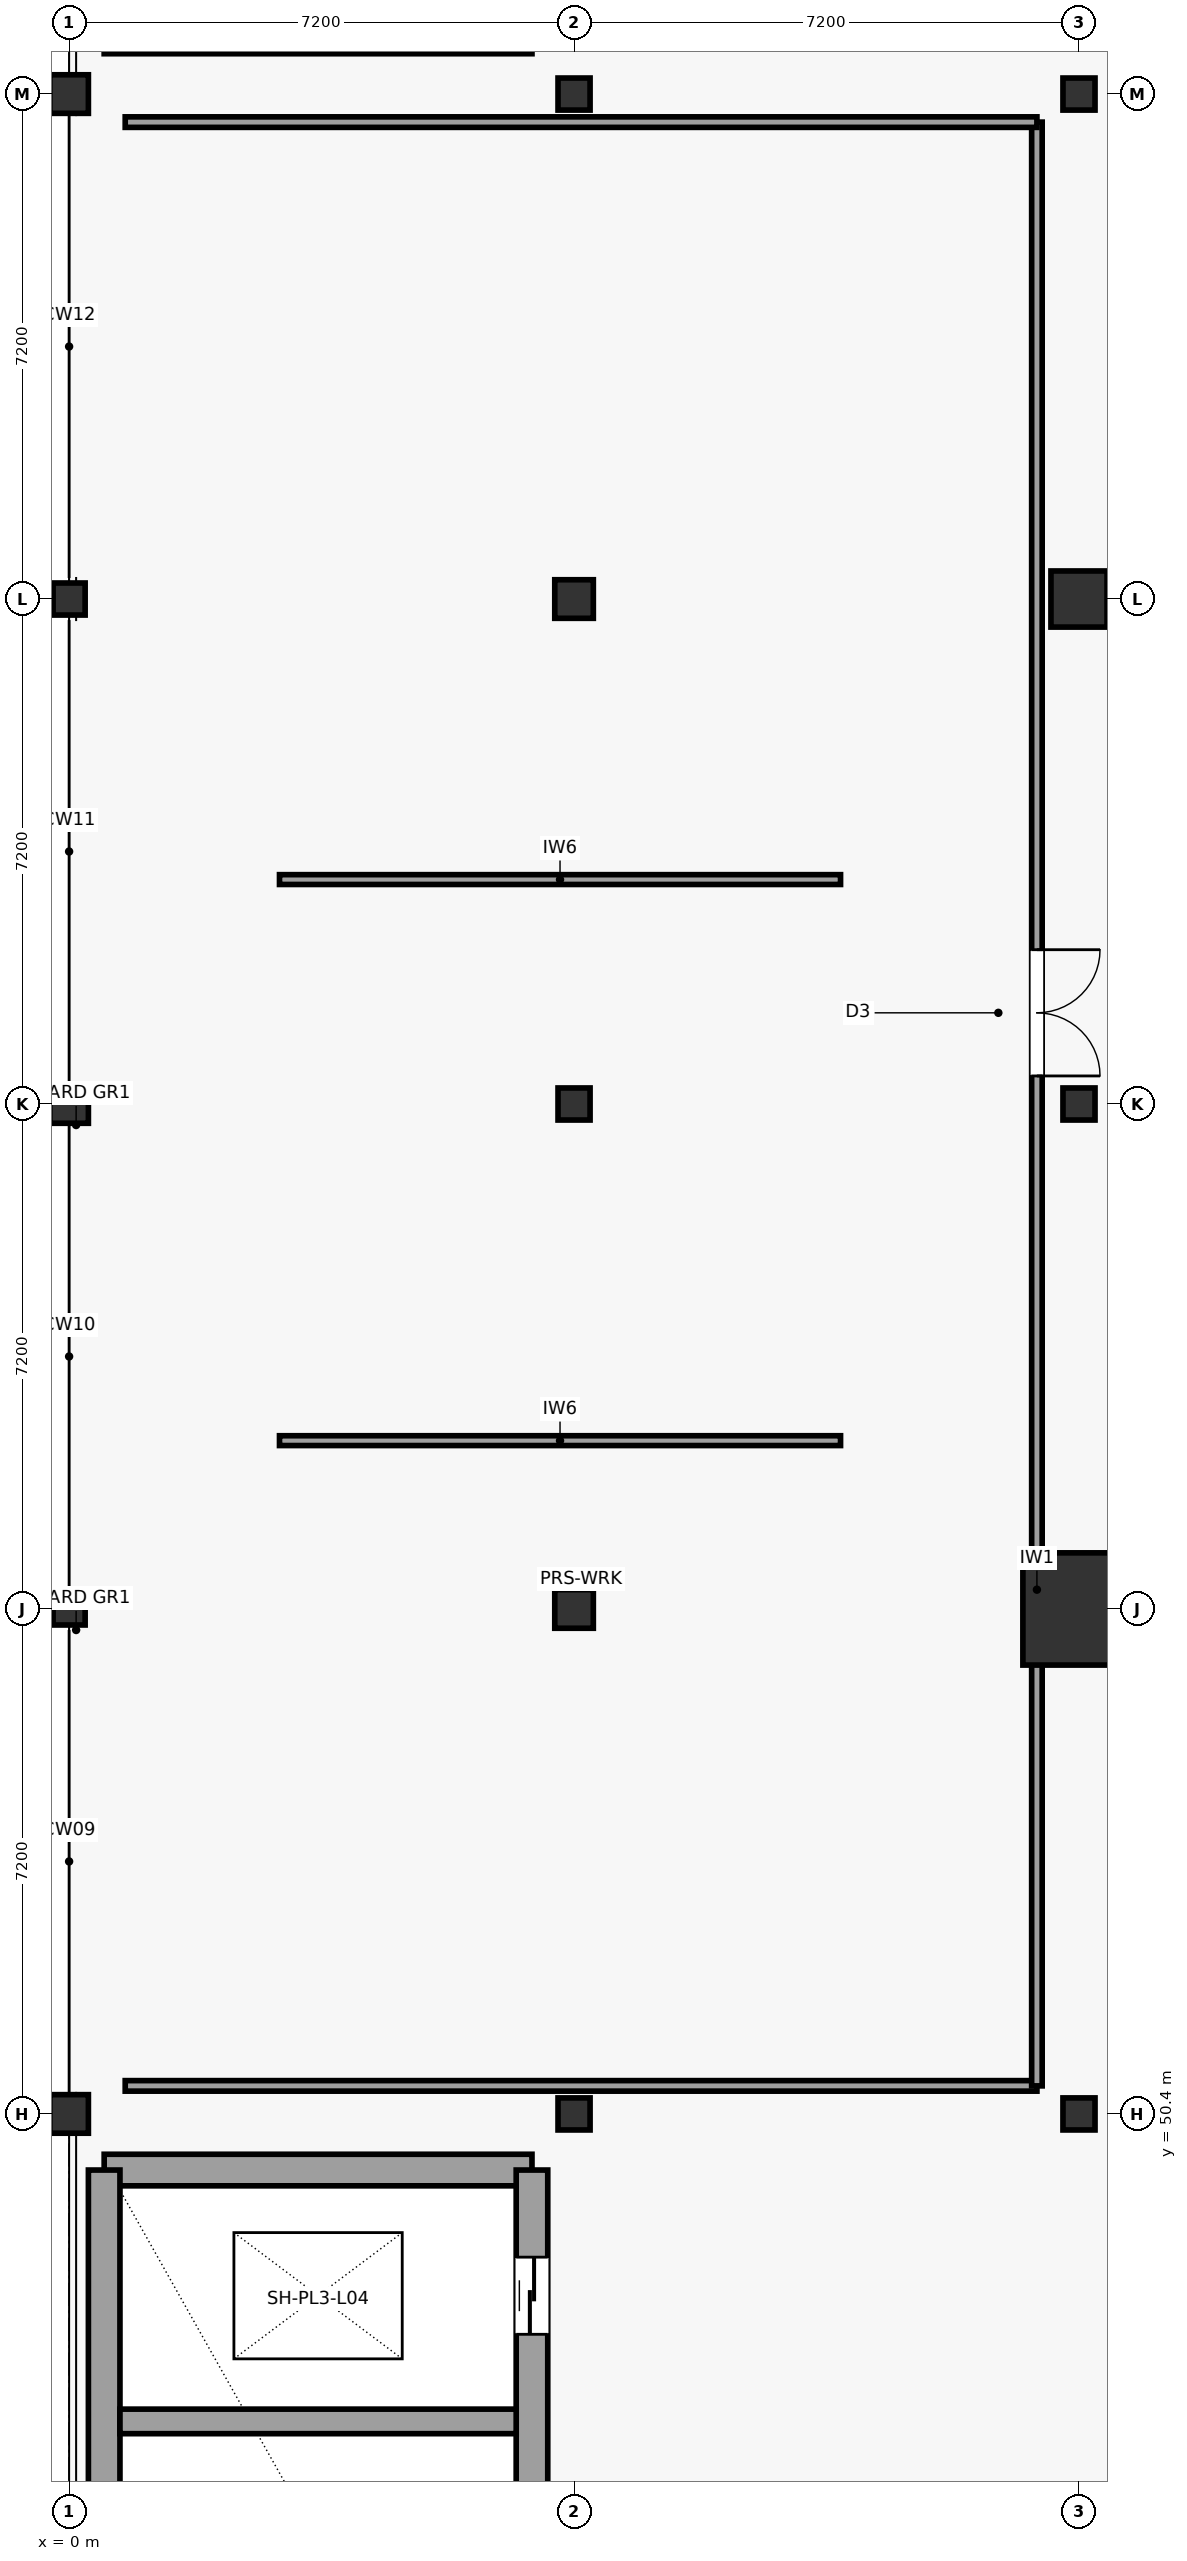
"""IFC4 building model, lengths in metres.
Left out: names, types, materials, properties, quantities, classifications, styles, units other than length and angle.
Written with IfcOpenShell. Run it as: python <this file> out.ifc"""

import sys

from ifc_helpers import new_model, si_unit, direction, frame, frame_2d, origin, origin_2d, place, context, subcontext, project, spatial, rectangle, circle, hollow_circle, extrude, element, fill, save


model = new_model("IFC4")
c1 = context("Model", 3, precision=1e-05, world=origin(), true_north=direction((0.0, 1.0)))
c2 = subcontext(c1, "Body", "Model", "MODEL_VIEW")
j1 = project(units=[si_unit("LENGTHUNIT", "METRE"), si_unit("PLANEANGLEUNIT", "RADIAN")], contexts=[c1])
p1 = place(None, origin())
s1 = spatial("IfcSite", under=j1, at=p1, CompositionType="ELEMENT")
p2 = place(p1, origin())
s2 = spatial("IfcBuilding", under=s1, at=p2, CompositionType="ELEMENT")
p3 = place(p2, frame((0.0, 0.0, 18.6)))
s3 = spatial("IfcBuildingStorey", under=s2, at=p3, CompositionType="ELEMENT", Elevation=18.6)
p4 = place(p3, frame((0.0, 50.4, 0.0), z_axis=(0.0, 0.0, 1.0), x_axis=(1.0, 0.0, 0.0)))
e1 = element("IfcColumn", 1, at=p4, inside=s3, PredefinedType="COLUMN", context=c2, shape_type="SweptSolid", body=[
    extrude(rectangle(XDim=0.55, YDim=0.55, at=origin_2d()), origin(), (0.0, 0.0, 1.0), 4.4),
])
p5 = place(p3, frame((0.0, 57.6, 0.0), z_axis=(0.0, 0.0, 1.0), x_axis=(1.0, 0.0, 0.0)))
e2 = element("IfcColumn", 2, at=p5, inside=s3, PredefinedType="COLUMN", context=c2, shape_type="SweptSolid", body=[
    extrude(hollow_circle(Radius=0.229, WallThickness=0.02, at=origin_2d()), origin(), (0.0, 0.0, 1.0), 4.4),
])
p6 = place(p3, frame((0.0, 64.8, 0.0), z_axis=(0.0, 0.0, 1.0), x_axis=(1.0, 0.0, 0.0)))
e3 = element("IfcColumn", 3, at=p6, inside=s3, PredefinedType="COLUMN", context=c2, shape_type="SweptSolid", body=[
    extrude(rectangle(XDim=0.55, YDim=0.55, at=origin_2d()), origin(), (0.0, 0.0, 1.0), 4.4),
])
p7 = place(p3, frame((0.0, 72.0, 0.0), z_axis=(0.0, 0.0, 1.0), x_axis=(1.0, 0.0, 0.0)))
e4 = element("IfcColumn", 4, at=p7, inside=s3, PredefinedType="COLUMN", context=c2, shape_type="SweptSolid", body=[
    extrude(hollow_circle(Radius=0.229, WallThickness=0.02, at=origin_2d()), origin(), (0.0, 0.0, 1.0), 4.4),
])
p8 = place(p3, frame((0.0, 79.2, 0.0), z_axis=(0.0, 0.0, 1.0), x_axis=(1.0, 0.0, 0.0)))
e5 = element("IfcColumn", 5, at=p8, inside=s3, PredefinedType="COLUMN", context=c2, shape_type="SweptSolid", body=[
    extrude(rectangle(XDim=0.55, YDim=0.55, at=origin_2d()), origin(), (0.0, 0.0, 1.0), 4.4),
])
p9 = place(p3, frame((7.2, 50.4, 0.0), z_axis=(0.0, 0.0, 1.0), x_axis=(1.0, 0.0, 0.0)))
e6 = element("IfcColumn", 6, at=p9, inside=s3, PredefinedType="COLUMN", context=c2, shape_type="SweptSolid", body=[
    extrude(hollow_circle(Radius=0.229, WallThickness=0.02, at=origin_2d()), origin(), (0.0, 0.0, 1.0), 4.4),
])
p10 = place(p3, frame((7.2, 57.6, 0.0), z_axis=(0.0, 0.0, 1.0), x_axis=(1.0, 0.0, 0.0)))
e7 = element("IfcColumn", 7, at=p10, inside=s3, PredefinedType="COLUMN", context=c2, shape_type="SweptSolid", body=[
    extrude(rectangle(XDim=0.55, YDim=0.55, at=origin_2d()), origin(), (0.0, 0.0, 1.0), 4.4),
])
p11 = place(p3, frame((7.2, 64.8, 0.0), z_axis=(0.0, 0.0, 1.0), x_axis=(1.0, 0.0, 0.0)))
e8 = element("IfcColumn", 8, at=p11, inside=s3, PredefinedType="COLUMN", context=c2, shape_type="SweptSolid", body=[
    extrude(hollow_circle(Radius=0.229, WallThickness=0.02, at=origin_2d()), origin(), (0.0, 0.0, 1.0), 4.4),
])
p12 = place(p3, frame((7.2, 72.0, 0.0), z_axis=(0.0, 0.0, 1.0), x_axis=(1.0, 0.0, 0.0)))
e9 = element("IfcColumn", 9, at=p12, inside=s3, PredefinedType="COLUMN", context=c2, shape_type="SweptSolid", body=[
    extrude(rectangle(XDim=0.55, YDim=0.55, at=origin_2d()), origin(), (0.0, 0.0, 1.0), 4.4),
])
for number, where, z_axis, x_axis in (
    (10, (7.2, 79.2, 0.0), (0.0, 0.0, 1.0), (1.0, 0.0, 0.0)),
    (11, (14.4, 50.4, 0.0), (0.0, 0.0, 1.0), (1.0, 0.0, 0.0)),
):
    element("IfcColumn", number, at=place(p3, frame(where, z_axis=z_axis, x_axis=x_axis)), inside=s3, PredefinedType="COLUMN", context=c2, shape_type="SweptSolid", body=[
        extrude(hollow_circle(Radius=0.229, WallThickness=0.02, at=origin_2d()), origin(), (0.0, 0.0, 1.0), 4.4),
    ])
p13 = place(p3, frame((14.4, 57.6, 0.0), z_axis=(0.0, 0.0, 1.0), x_axis=(1.0, 0.0, 0.0)))
e12 = element("IfcColumn", 12, at=p13, inside=s3, PredefinedType="COLUMN", context=c2, shape_type="SweptSolid", body=[
    extrude(circle(Radius=0.8, at=origin_2d()), origin(), (0.0, 0.0, 1.0), 4.4),
])
p14 = place(p3, frame((14.4, 64.8, 0.0), z_axis=(0.0, 0.0, 1.0), x_axis=(1.0, 0.0, 0.0)))
e13 = element("IfcColumn", 13, at=p14, inside=s3, PredefinedType="COLUMN", context=c2, shape_type="SweptSolid", body=[
    extrude(hollow_circle(Radius=0.229, WallThickness=0.02, at=origin_2d()), origin(), (0.0, 0.0, 1.0), 4.4),
])
p15 = place(p3, frame((14.4, 72.0, 0.0), z_axis=(0.0, 0.0, 1.0), x_axis=(1.0, 0.0, 0.0)))
e14 = element("IfcColumn", 14, at=p15, inside=s3, PredefinedType="COLUMN", context=c2, shape_type="SweptSolid", body=[
    extrude(circle(Radius=0.4, at=origin_2d()), origin(), (0.0, 0.0, 1.0), 4.4),
])
p16 = place(p3, frame((14.4, 79.2, 0.0), z_axis=(0.0, 0.0, 1.0), x_axis=(1.0, 0.0, 0.0)))
e15 = element("IfcColumn", 15, at=p16, inside=s3, PredefinedType="COLUMN", context=c2, shape_type="SweptSolid", body=[
    extrude(hollow_circle(Radius=0.229, WallThickness=0.02, at=origin_2d()), origin(), (0.0, 0.0, 1.0), 4.4),
])
p17 = place(p3, frame((0.5, 49.6, 0.0), z_axis=(0.0, 0.0, 1.0), x_axis=(1.0, 0.0, 0.0)))
e16 = element("IfcWall", 16, at=p17, inside=s3, PredefinedType="SHEAR", context=c2, shape_type="SweptSolid", body=[
    extrude(rectangle(XDim=6.1, YDim=0.45, at=frame_2d((3.05, 0.0))), origin(), (0.0, 0.0, 1.0), 4.15),
])
p18 = place(p3, frame((0.5, 36.8, 0.0), z_axis=(0.0, 0.0, 1.0), x_axis=(0.0, 1.0, 0.0)))
e17 = element("IfcWall", 17, at=p18, inside=s3, PredefinedType="SHEAR", context=c2, shape_type="SweptSolid", body=[
    extrude(rectangle(XDim=12.8, YDim=0.45, at=frame_2d((6.4, 0.0))), origin(), (0.0, 0.0, 1.0), 4.15),
])
p19 = place(p3, frame((6.6, 36.8, 0.0), z_axis=(0.0, 0.0, 1.0), x_axis=(0.0, 1.0, 0.0)))
e18 = element("IfcWall", 18, at=p19, inside=s3, PredefinedType="SHEAR", context=c2, shape_type="SweptSolid", body=[
    extrude(rectangle(XDim=12.8, YDim=0.45, at=frame_2d((6.4, 0.0))), origin(), (0.0, 0.0, 1.0), 4.15),
])
p20 = place(p19, frame((0.55, 0.0, 0.0)))
e19 = element("IfcOpeningElement", 19, at=p20, cuts=e18, PredefinedType="OPENING", context=c2, shape_type="SweptSolid", body=[
    extrude(rectangle(XDim=1.2, YDim=2.25, at=frame_2d((0.6, 1.125))), frame((0.0, 0.235, 0.0), z_axis=(0.0, -1.0, 0.0), x_axis=(1.0, 0.0, 0.0)), (0.0, 0.0, 1.0), 0.47),
])
p21 = place(p19, frame((10.458, 0.0, 0.0)))
e20 = element("IfcOpeningElement", 20, at=p21, cuts=e18, PredefinedType="OPENING", context=c2, shape_type="SweptSolid", body=[
    extrude(rectangle(XDim=1.1, YDim=2.2, at=frame_2d((0.55, 1.1))), frame((0.0, 0.235, 0.0), z_axis=(0.0, -1.0, 0.0), x_axis=(1.0, 0.0, 0.0)), (0.0, 0.0, 1.0), 0.47),
])
p22 = place(p3, frame((0.725, 46.016, 0.0), z_axis=(0.0, 0.0, 1.0), x_axis=(1.0, 0.0, 0.0)))
e21 = element("IfcWall", 21, at=p22, inside=s3, PredefinedType="SHEAR", context=c2, shape_type="SweptSolid", body=[
    extrude(rectangle(XDim=5.65, YDim=0.35, at=frame_2d((2.825, 0.0))), origin(), (0.0, 0.0, 1.0), 4.15),
])
p23 = place(p3, frame((0.5, 80.0, 0.0), z_axis=(0.0, 0.0, 1.0), x_axis=(1.0, 0.0, 0.0)))
e22 = element("IfcWall", 22, at=p23, inside=s3, PredefinedType="SHEAR", context=c2, shape_type="SweptSolid", body=[
    extrude(rectangle(XDim=6.1, YDim=0.45, at=frame_2d((3.05, 0.0))), origin(), (0.0, 0.0, 1.0), 4.15),
])
p24 = place(p3, frame((0.8, 50.8, 0.0), z_axis=(0.0, 0.0, 1.0), x_axis=(1.0, 0.0, 0.0)))
e23 = element("IfcWall", 23, at=p24, inside=s3, PredefinedType="PARTITIONING", context=c2, shape_type="SweptSolid", body=[
    extrude(rectangle(XDim=13.0, YDim=0.15, at=frame_2d((6.5, 0.0))), origin(), (0.0, 0.0, 1.0), 3.21),
])
p25 = place(p3, frame((13.8, 50.8, 0.0), z_axis=(0.0, 0.0, 1.0), x_axis=(0.0, 1.0, 0.0)))
e24 = element("IfcWall", 24, at=p25, inside=s3, PredefinedType="PARTITIONING", context=c2, shape_type="SweptSolid", body=[
    extrude(rectangle(XDim=28.0, YDim=0.15, at=frame_2d((14.0, 0.0))), origin(), (0.0, 0.0, 1.0), 3.21),
])
p26 = place(p25, frame((14.4, 0.0, 0.0)))
e25 = element("IfcOpeningElement", 25, at=p26, cuts=e24, PredefinedType="OPENING", context=c2, shape_type="SweptSolid", body=[
    extrude(rectangle(XDim=1.8, YDim=2.3, at=frame_2d((0.9, 1.15))), frame((0.0, 0.085, 0.0), z_axis=(0.0, -1.0, 0.0), x_axis=(1.0, 0.0, 0.0)), (0.0, 0.0, 1.0), 0.17),
])
p27 = place(p3, frame((13.8, 78.8, 0.0), z_axis=(0.0, 0.0, 1.0), x_axis=(-1.0, 0.0, 0.0)))
e26 = element("IfcWall", 26, at=p27, inside=s3, PredefinedType="PARTITIONING", context=c2, shape_type="SweptSolid", body=[
    extrude(rectangle(XDim=13.0, YDim=0.15, at=frame_2d((6.5, 0.0))), origin(), (0.0, 0.0, 1.0), 3.21),
])
for number, where, z_axis, x_axis in (
    (27, (3.0, 60.0, 0.0), (0.0, 0.0, 1.0), (1.0, 0.0, 0.0)),
    (28, (3.0, 68.0, 0.0), (0.0, 0.0, 1.0), (1.0, 0.0, 0.0)),
):
    element("IfcWall", number, at=place(p3, frame(where, z_axis=z_axis, x_axis=x_axis)), inside=s3, PredefinedType="MOVABLE", context=c2, shape_type="SweptSolid", body=[
        extrude(rectangle(XDim=8.0, YDim=0.14, at=frame_2d((4.0, 0.0))), origin(), (0.0, 0.0, 1.0), 3.2),
    ])
p28 = place(p21, origin())
e29 = element("IfcDoor", 29, at=p28, inside=s3, OperationType="SLIDING_TO_RIGHT", PredefinedType="DOOR", context=c2, shape_type="SweptSolid", body=[
    extrude(rectangle(XDim=1.1, YDim=2.2, at=frame_2d((0.55, 1.1))), frame((0.0, 0.025, 0.0), z_axis=(0.0, -1.0, 0.0), x_axis=(1.0, 0.0, 0.0)), (0.0, 0.0, 1.0), 0.05),
])
fill(e20, e29)
p29 = place(p26, frame((1.8, 0.0, 0.0), z_axis=(0.0, 0.0, 1.0), x_axis=(-1.0, 0.0, 0.0)))
e30 = element("IfcDoor", 30, at=p29, inside=s3, OperationType="DOUBLE_DOOR_SINGLE_SWING", PredefinedType="DOOR", context=c2, shape_type="SweptSolid", body=[
    extrude(rectangle(XDim=1.8, YDim=2.3, at=frame_2d((0.9, 1.15))), frame((0.0, 0.025, 0.0), z_axis=(0.0, -1.0, 0.0), x_axis=(1.0, 0.0, 0.0)), (0.0, 0.0, 1.0), 0.05),
])
fill(e25, e30)
save(model, sys.argv[1])
